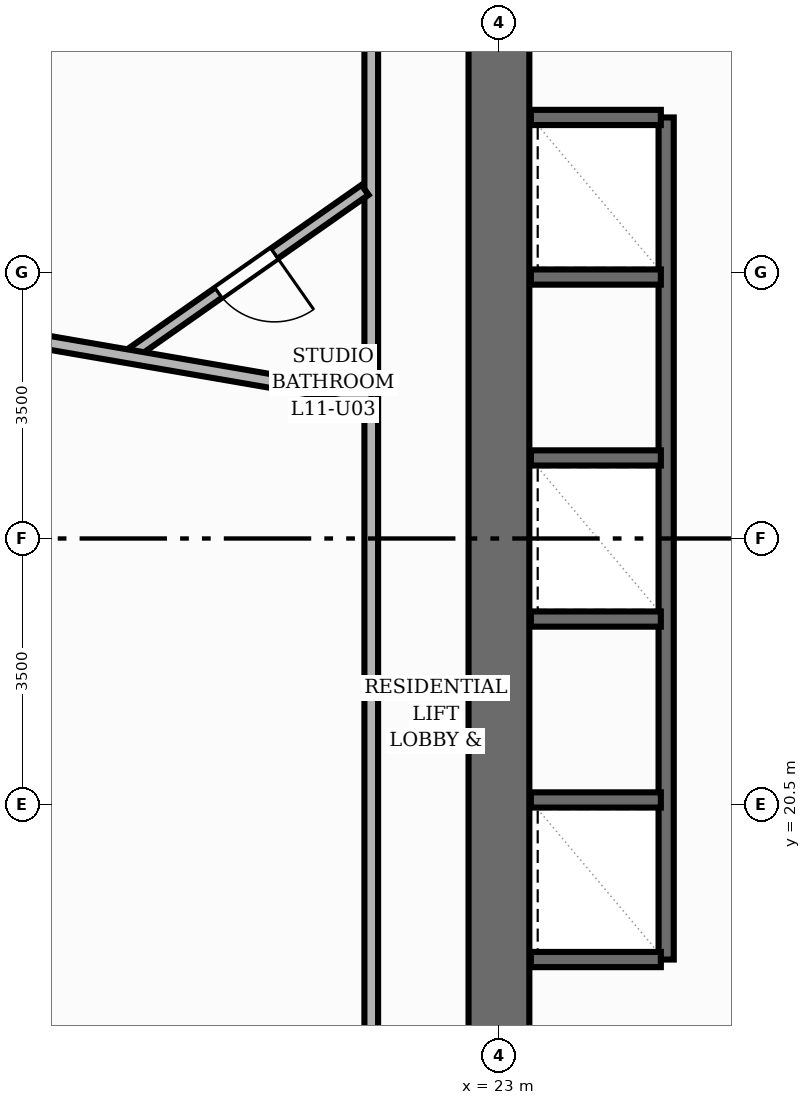
"""IFC4 building model, lengths in metres.
Left out: names, types, materials, properties, quantities, classifications, styles, units other than length and angle.
Written with IfcOpenShell. Run it as: python <this file> out.ifc"""

import sys

from ifc_helpers import new_model, si_unit, direction, frame, frame_2d, origin, place, context, subcontext, project, spatial, rectangle, extrude, element, fill, save


model = new_model("IFC4")
c1 = context("Model", 3, precision=1e-05, world=origin(), true_north=direction((0.0, 1.0)))
c2 = subcontext(c1, "Body", "Model", "MODEL_VIEW")
j1 = project(units=[si_unit("LENGTHUNIT", "METRE"), si_unit("PLANEANGLEUNIT", "RADIAN")], contexts=[c1])
p1 = place(None, origin())
s1 = spatial("IfcSite", under=j1, at=p1, CompositionType="ELEMENT")
p2 = place(p1, origin())
s2 = spatial("IfcBuilding", under=s1, at=p2, CompositionType="ELEMENT")
p3 = place(p2, frame((0.0, 0.0, 40.8)))
s3 = spatial("IfcBuildingStorey", under=s2, at=p3, CompositionType="ELEMENT", Elevation=40.8)
p4 = place(p3, frame((23.0, 17.4, 0.0), z_axis=(0.0, 0.0, 1.0), x_axis=(0.0, 1.0, 0.0)))
e1 = element("IfcWall", 1, at=p4, inside=s3, PredefinedType="SHEAR", context=c2, shape_type="SweptSolid", body=[
    extrude(rectangle(XDim=13.2, YDim=0.8, at=frame_2d((6.6, 0.0))), origin(), (0.0, 0.0, 1.0), 3.2),
])
p5 = place(p3, frame((25.2, 18.46, 0.0), z_axis=(0.0, 0.0, 1.0), x_axis=(0.0, 1.0, 0.0)))
e2 = element("IfcWall", 2, at=p5, inside=s3, PredefinedType="SHEAR", context=c2, shape_type="SweptSolid", body=[
    extrude(rectangle(XDim=11.08, YDim=0.2, at=frame_2d((5.54, 0.0))), origin(), (0.0, 0.0, 1.0), 3.2),
])
for number, where, z_axis, x_axis in (
    (3, (23.42, 18.46, 0.0), (0.0, 0.0, 1.0), (1.0, 0.0, 0.0)),
    (4, (23.42, 29.54, 0.0), (0.0, 0.0, 1.0), (1.0, 0.0, 0.0)),
    (5, (23.42, 20.56, 0.0), (0.0, 0.0, 1.0), (1.0, 0.0, 0.0)),
    (6, (23.42, 22.94, 0.0), (0.0, 0.0, 1.0), (1.0, 0.0, 0.0)),
    (7, (23.42, 25.06, 0.0), (0.0, 0.0, 1.0), (1.0, 0.0, 0.0)),
    (8, (23.42, 27.44, 0.0), (0.0, 0.0, 1.0), (1.0, 0.0, 0.0)),
):
    element("IfcWall", number, at=place(p3, frame(where, z_axis=z_axis, x_axis=x_axis)), inside=s3, PredefinedType="SHEAR", context=c2, shape_type="SweptSolid", body=[
        extrude(rectangle(XDim=1.71, YDim=0.2, at=frame_2d((0.855, 0.0))), origin(), (0.0, 0.0, 1.0), 3.2),
    ])
p6 = place(p3, frame((21.32, 15.32, 0.0), z_axis=(0.0, 0.0, 1.0), x_axis=(0.0, 1.0, 0.0)))
e9 = element("IfcWall", 9, at=p6, inside=s3, PredefinedType="PARTITIONING", context=c2, shape_type="SweptSolid", body=[
    extrude(rectangle(XDim=17.36, YDim=0.18, at=frame_2d((8.68, 0.0))), origin(), (0.0, 0.0, 1.0), 2.955),
])
p7 = place(p3, frame((21.238, 28.587, 0.0), z_axis=(0.0, 0.0, 1.0), x_axis=(-0.818554579869, -0.57442875953, 0.0)))
e10 = element("IfcWall", 10, at=p7, inside=s3, PredefinedType="PLUMBINGWALL", context=c2, shape_type="SweptSolid", body=[
    extrude(rectangle(XDim=3.813, YDim=0.16, at=frame_2d((1.907, 0.0))), origin(), (0.0, 0.0, 1.0), 2.955),
])
p8 = place(p7, frame((1.457, 0.0, 0.0)))
e11 = element("IfcOpeningElement", 11, at=p8, cuts=e10, PredefinedType="OPENING", context=c2, shape_type="SweptSolid", body=[
    extrude(rectangle(XDim=0.9, YDim=2.1, at=frame_2d((0.45, 1.05))), frame((0.0, 0.09, 0.0), z_axis=(0.0, -1.0, 0.0), x_axis=(1.0, 0.0, 0.0)), (0.0, 0.0, 1.0), 0.18),
])
p9 = place(p3, frame((21.32, 25.844, 0.0), z_axis=(0.0, 0.0, 1.0), x_axis=(-0.985428411656, 0.170090697865, 0.0)))
e12 = element("IfcWall", 12, at=p9, inside=s3, PredefinedType="PARTITIONING", context=c2, shape_type="SweptSolid", body=[
    extrude(rectangle(XDim=5.694, YDim=0.18, at=frame_2d((2.847, 0.0))), origin(), (0.0, 0.0, 1.0), 2.178),
])
p10 = place(p8, origin())
e13 = element("IfcDoor", 13, at=p10, inside=s3, OperationType="SINGLE_SWING_LEFT", PredefinedType="DOOR", context=c2, shape_type="SweptSolid", body=[
    extrude(rectangle(XDim=0.9, YDim=2.1, at=frame_2d((0.45, 1.05))), frame((0.0, 0.025, 0.0), z_axis=(0.0, -1.0, 0.0), x_axis=(1.0, 0.0, 0.0)), (0.0, 0.0, 1.0), 0.05),
])
fill(e11, e13)
save(model, sys.argv[1])
